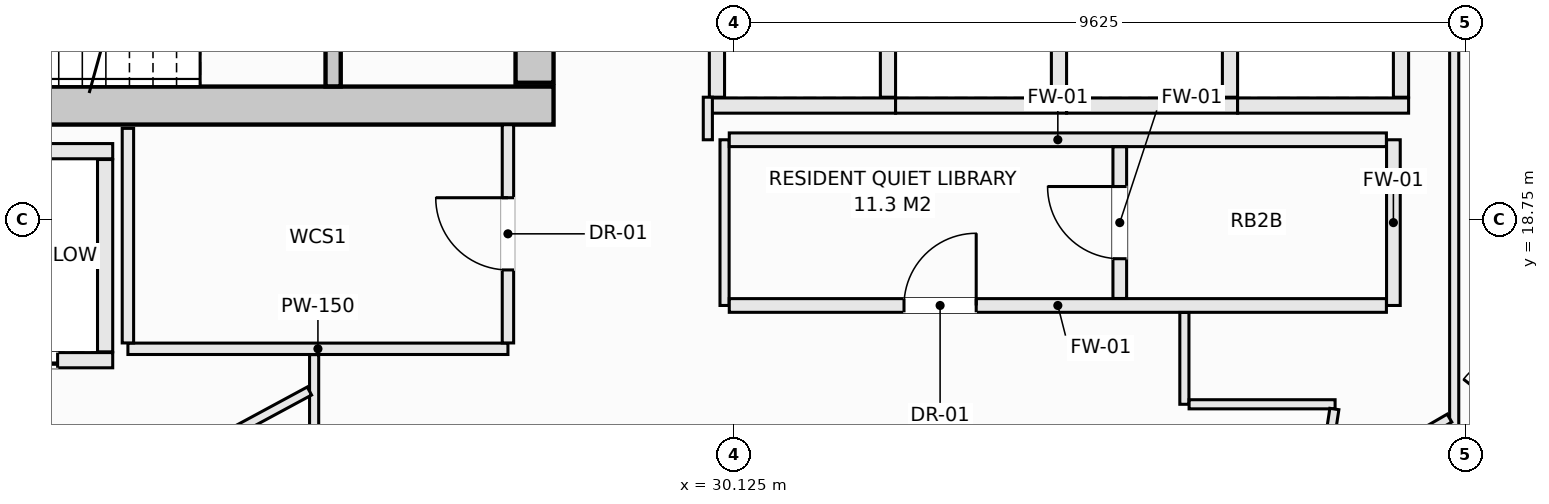
"""IFC4 building model, lengths in metres.
Left out: names, types, materials, properties, quantities, classifications, styles, units other than length and angle.
Written with IfcOpenShell. Run it as: python <this file> out.ifc"""

import sys

from ifc_helpers import new_model, si_unit, direction, frame, frame_2d, origin, place, context, subcontext, project, spatial, rectangle, extrude, element, fill, save


model = new_model("IFC4")
c1 = context("Model", 3, precision=1e-05, world=origin(), true_north=direction((0.0, 1.0)))
c2 = subcontext(c1, "Body", "Model", "MODEL_VIEW")
j1 = project(units=[si_unit("LENGTHUNIT", "METRE"), si_unit("PLANEANGLEUNIT", "RADIAN")], contexts=[c1])
p1 = place(None, origin())
s1 = spatial("IfcSite", under=j1, at=p1, CompositionType="ELEMENT")
p2 = place(p1, origin())
s2 = spatial("IfcBuilding", under=s1, at=p2, CompositionType="ELEMENT")
p3 = place(p2, frame((0.0, 0.0, 255.8)))
s3 = spatial("IfcBuildingStorey", under=s2, at=p3, CompositionType="ELEMENT", Elevation=255.8)
p4 = place(p3, frame((14.25, 20.25, -0.27), z_axis=(0.0, 0.0, 1.0), x_axis=(1.0, 0.0, 0.0)))
e1 = element("IfcWall", 1, at=p4, inside=s3, PredefinedType="SHEAR", context=c2, shape_type="SweptSolid", body=[
    extrude(rectangle(XDim=13.5, YDim=0.5, at=frame_2d((6.75, 0.0))), origin(), (0.0, 0.0, 1.0), 3.3),
])
p5 = place(p3, frame((27.5, 20.55, -0.27), z_axis=(0.0, 0.0, 1.0), x_axis=(0.0, 1.0, 0.0)))
e2 = element("IfcWall", 2, at=p5, inside=s3, PredefinedType="SHEAR", context=c2, shape_type="SweptSolid", body=[
    extrude(rectangle(XDim=1.5, YDim=0.5, at=frame_2d((0.75, 0.0))), origin(), (0.0, 0.0, 1.0), 3.3),
])
p6 = place(p3, frame((24.85, 20.502, -0.27), z_axis=(0.0, 0.0, 1.0), x_axis=(0.0, 1.0, 0.0)))
e3 = element("IfcWall", 3, at=p6, inside=s3, PredefinedType="SHEAR", context=c2, shape_type="SweptSolid", body=[
    extrude(rectangle(XDim=3.038, YDim=0.2, at=frame_2d((1.519, 0.0))), origin(), (0.0, 0.0, 1.0), 3.3),
])
p7 = place(p6, frame((0.969, 0.0, 0.27)))
e4 = element("IfcOpeningElement", 4, at=p7, cuts=e3, PredefinedType="OPENING", context=c2, shape_type="SweptSolid", body=[
    extrude(rectangle(XDim=1.1, YDim=2.15, at=frame_2d((0.55, 1.075))), frame((0.0, 0.11, 0.0), z_axis=(0.0, -1.0, 0.0), x_axis=(1.0, 0.0, 0.0)), (0.0, 0.0, 1.0), 0.22),
])
p8 = place(p3, frame((19.4, 19.65, 0.0), z_axis=(0.0, 0.0, 1.0), x_axis=(1.0, 0.0, 0.0)))
e5 = element("IfcWall", 5, at=p8, inside=s3, PredefinedType="SOLIDWALL", context=c2, shape_type="SweptSolid", body=[
    extrude(rectangle(XDim=2.55, YDim=0.2, at=frame_2d((1.275, 0.0))), origin(), (0.0, 0.0, 1.0), 3.03),
])
p9 = place(p3, frame((19.4, 16.9, 0.0), z_axis=(0.0, 0.0, 1.0), x_axis=(1.0, 0.0, 0.0)))
e6 = element("IfcWall", 6, at=p9, inside=s3, PredefinedType="SOLIDWALL", context=c2, shape_type="SweptSolid", body=[
    extrude(rectangle(XDim=2.55, YDim=0.2, at=frame_2d((1.275, 0.0))), origin(), (0.0, 0.0, 1.0), 3.03),
])
p10 = place(p9, frame((0.725, 0.0, 0.0)))
e7 = element("IfcOpeningElement", 7, at=p10, cuts=e6, PredefinedType="OPENING", context=c2, shape_type="SweptSolid", body=[
    extrude(rectangle(XDim=1.1, YDim=2.2, at=frame_2d((0.55, 1.1))), frame((0.0, 0.11, 0.0), z_axis=(0.0, -1.0, 0.0), x_axis=(1.0, 0.0, 0.0)), (0.0, 0.0, 1.0), 0.22),
])
p11 = place(p3, frame((21.85, 17.01, 0.0), z_axis=(0.0, 0.0, 1.0), x_axis=(0.0, 1.0, 0.0)))
e8 = element("IfcWall", 8, at=p11, inside=s3, PredefinedType="SOLIDWALL", context=c2, shape_type="SweptSolid", body=[
    extrude(rectangle(XDim=2.53, YDim=0.2, at=frame_2d((1.265, 0.0))), origin(), (0.0, 0.0, 1.0), 3.03),
])
p12 = place(p3, frame((29.8, 20.25, 0.0), z_axis=(0.0, 0.0, 1.0), x_axis=(1.0, 0.0, 0.0)))
e9 = element("IfcWall", 9, at=p12, inside=s3, PredefinedType="SOLIDWALL", context=c2, shape_type="SweptSolid", body=[
    extrude(rectangle(XDim=2.45, YDim=0.2, at=frame_2d((1.225, 0.0))), origin(), (0.0, 0.0, 1.0), 3.03),
])
for number, where, z_axis, x_axis in (
    (10, (29.9, 20.36, 0.0), (0.0, 0.0, 1.0), (0.0, 1.0, 0.0)),
    (11, (32.15, 20.36, 0.0), (0.0, 0.0, 1.0), (0.0, 1.0, 0.0)),
):
    element("IfcWall", number, at=place(p3, frame(where, z_axis=z_axis, x_axis=x_axis)), inside=s3, PredefinedType="SOLIDWALL", context=c2, shape_type="SweptSolid", body=[
        extrude(rectangle(XDim=2.43, YDim=0.2, at=frame_2d((1.215, 0.0))), origin(), (0.0, 0.0, 1.0), 3.03),
    ])
p13 = place(p3, frame((32.25, 20.25, 0.0), z_axis=(0.0, 0.0, 1.0), x_axis=(1.0, 0.0, 0.0)))
e12 = element("IfcWall", 12, at=p13, inside=s3, PredefinedType="SOLIDWALL", context=c2, shape_type="SweptSolid", body=[
    extrude(rectangle(XDim=2.25, YDim=0.2, at=frame_2d((1.125, 0.0))), origin(), (0.0, 0.0, 1.0), 3.03),
])
p14 = place(p3, frame((34.4, 20.36, 0.0), z_axis=(0.0, 0.0, 1.0), x_axis=(0.0, 1.0, 0.0)))
e13 = element("IfcWall", 13, at=p14, inside=s3, PredefinedType="SOLIDWALL", context=c2, shape_type="SweptSolid", body=[
    extrude(rectangle(XDim=2.43, YDim=0.2, at=frame_2d((1.215, 0.0))), origin(), (0.0, 0.0, 1.0), 3.03),
])
p15 = place(p3, frame((34.5, 20.25, 0.0), z_axis=(0.0, 0.0, 1.0), x_axis=(1.0, 0.0, 0.0)))
e14 = element("IfcWall", 14, at=p15, inside=s3, PredefinedType="SOLIDWALL", context=c2, shape_type="SweptSolid", body=[
    extrude(rectangle(XDim=2.25, YDim=0.2, at=frame_2d((1.125, 0.0))), origin(), (0.0, 0.0, 1.0), 3.03),
])
p16 = place(p3, frame((36.65, 20.36, 0.0), z_axis=(0.0, 0.0, 1.0), x_axis=(0.0, 1.0, 0.0)))
e15 = element("IfcWall", 15, at=p16, inside=s3, PredefinedType="SOLIDWALL", context=c2, shape_type="SweptSolid", body=[
    extrude(rectangle(XDim=2.43, YDim=0.2, at=frame_2d((1.215, 0.0))), origin(), (0.0, 0.0, 1.0), 3.03),
])
p17 = place(p3, frame((36.75, 20.25, 0.0), z_axis=(0.0, 0.0, 1.0), x_axis=(1.0, 0.0, 0.0)))
e16 = element("IfcWall", 16, at=p17, inside=s3, PredefinedType="SOLIDWALL", context=c2, shape_type="SweptSolid", body=[
    extrude(rectangle(XDim=2.25, YDim=0.2, at=frame_2d((1.125, 0.0))), origin(), (0.0, 0.0, 1.0), 3.03),
])
p18 = place(p3, frame((38.9, 20.36, 0.0), z_axis=(0.0, 0.0, 1.0), x_axis=(0.0, 1.0, 0.0)))
e17 = element("IfcWall", 17, at=p18, inside=s3, PredefinedType="SOLIDWALL", context=c2, shape_type="SweptSolid", body=[
    extrude(rectangle(XDim=2.43, YDim=0.2, at=frame_2d((1.215, 0.0))), origin(), (0.0, 0.0, 1.0), 3.03),
])
p19 = place(p3, frame((22.15, 17.05, 0.0), z_axis=(0.0, 0.0, 1.0), x_axis=(1.0, 0.0, 0.0)))
e18 = element("IfcWall", 18, at=p19, inside=s3, PredefinedType="PARTITIONING", context=c2, shape_type="SweptSolid", body=[
    extrude(rectangle(XDim=5.0, YDim=0.15, at=frame_2d((2.5, 0.0))), origin(), (0.0, 0.0, 1.0), 3.03),
])
p20 = place(p3, frame((22.15, 17.127, 0.0), z_axis=(0.0, 0.0, 1.0), x_axis=(0.0, 1.0, 0.0)))
e19 = element("IfcWall", 19, at=p20, inside=s3, PredefinedType="PARTITIONING", context=c2, shape_type="SweptSolid", body=[
    extrude(rectangle(XDim=2.823, YDim=0.15, at=frame_2d((1.412, 0.0))), origin(), (0.0, 0.0, 1.0), 3.03),
])
p21 = place(p3, frame((27.15, 17.127, 0.0), z_axis=(0.0, 0.0, 1.0), x_axis=(0.0, 1.0, 0.0)))
e20 = element("IfcWall", 20, at=p21, inside=s3, PredefinedType="PARTITIONING", context=c2, shape_type="SweptSolid", body=[
    extrude(rectangle(XDim=2.871, YDim=0.15, at=frame_2d((1.436, 0.0))), origin(), (0.0, 0.0, 1.0), 3.03),
])
p22 = place(p21, frame((0.96, 0.0, 0.0)))
e21 = element("IfcOpeningElement", 21, at=p22, cuts=e20, PredefinedType="OPENING", context=c2, shape_type="SweptSolid", body=[
    extrude(rectangle(XDim=0.95, YDim=2.1, at=frame_2d((0.475, 1.05))), frame((0.0, 0.085, 0.0), z_axis=(0.0, -1.0, 0.0), x_axis=(1.0, 0.0, 0.0)), (0.0, 0.0, 1.0), 0.17),
])
p23 = place(p3, frame((30.0, 17.62, 0.0), z_axis=(0.0, 0.0, 1.0), x_axis=(0.0, 1.0, 0.0)))
e22 = element("IfcWall", 22, at=p23, inside=s3, PredefinedType="PARTITIONING", context=c2, shape_type="SweptSolid", body=[
    extrude(rectangle(XDim=2.18, YDim=0.12, at=frame_2d((1.09, 0.0))), origin(), (0.0, 0.0, 1.0), 3.03),
])
p24 = place(p3, frame((38.8, 17.62, 0.0), z_axis=(0.0, 0.0, 1.0), x_axis=(0.0, 1.0, 0.0)))
e23 = element("IfcWall", 23, at=p24, inside=s3, PredefinedType="SOLIDWALL", context=c2, shape_type="SweptSolid", body=[
    extrude(rectangle(XDim=2.18, YDim=0.18, at=frame_2d((1.09, 0.0))), origin(), (0.0, 0.0, 1.0), 3.03),
])
p25 = place(p3, frame((30.062, 17.62, 0.0), z_axis=(0.0, 0.0, 1.0), x_axis=(1.0, 0.0, 0.0)))
e24 = element("IfcWall", 24, at=p25, inside=s3, PredefinedType="SOLIDWALL", context=c2, shape_type="SweptSolid", body=[
    extrude(rectangle(XDim=8.646, YDim=0.18, at=frame_2d((4.323, 0.0))), origin(), (0.0, 0.0, 1.0), 3.03),
])
p26 = place(p25, frame((2.299, 0.0, 0.0)))
e25 = element("IfcOpeningElement", 25, at=p26, cuts=e24, PredefinedType="OPENING", context=c2, shape_type="SweptSolid", body=[
    extrude(rectangle(XDim=0.95, YDim=2.1, at=frame_2d((0.475, 1.05))), frame((0.0, 0.1, 0.0), z_axis=(0.0, -1.0, 0.0), x_axis=(1.0, 0.0, 0.0)), (0.0, 0.0, 1.0), 0.2),
])
p27 = place(p3, frame((30.062, 19.8, 0.0), z_axis=(0.0, 0.0, 1.0), x_axis=(1.0, 0.0, 0.0)))
e26 = element("IfcWall", 26, at=p27, inside=s3, PredefinedType="SOLIDWALL", context=c2, shape_type="SweptSolid", body=[
    extrude(rectangle(XDim=8.646, YDim=0.18, at=frame_2d((4.323, 0.0))), origin(), (0.0, 0.0, 1.0), 3.03),
])
p28 = place(p3, frame((35.2, 17.712, 0.0), z_axis=(0.0, 0.0, 1.0), x_axis=(0.0, 1.0, 0.0)))
e27 = element("IfcWall", 27, at=p28, inside=s3, PredefinedType="SOLIDWALL", context=c2, shape_type="SweptSolid", body=[
    extrude(rectangle(XDim=1.996, YDim=0.18, at=frame_2d((0.998, 0.0))), origin(), (0.0, 0.0, 1.0), 3.03),
])
p29 = place(p28, frame((0.523, 0.0, 0.0)))
e28 = element("IfcOpeningElement", 28, at=p29, cuts=e27, PredefinedType="OPENING", context=c2, shape_type="SweptSolid", body=[
    extrude(rectangle(XDim=0.95, YDim=2.1, at=frame_2d((0.475, 1.05))), frame((0.0, 0.1, 0.0), z_axis=(0.0, -1.0, 0.0), x_axis=(1.0, 0.0, 0.0)), (0.0, 0.0, 1.0), 0.2),
])
p30 = place(p3, frame((39.6, 14.952, 0.0), z_axis=(0.0, 0.0, 1.0), x_axis=(0.0, 1.0, 0.0)))
e29 = element("IfcWall", 29, at=p30, inside=s3, PredefinedType="PARTITIONING", context=c2, shape_type="SweptSolid", body=[
    extrude(rectangle(XDim=8.068, YDim=0.12, at=frame_2d((4.034, 0.0))), origin(), (0.0, 0.0, 1.0), 2.478),
])
p31 = place(p3, frame((39.662, 15.031, 0.0), z_axis=(0.0, 0.0, 1.0), x_axis=(0.616500468458, 0.787354540465, 0.0)))
e30 = element("IfcWall", 30, at=p31, inside=s3, PredefinedType="PARTITIONING", context=c2, shape_type="SweptSolid", body=[
    extrude(rectangle(XDim=3.014, YDim=0.12, at=frame_2d((1.507, 0.0))), origin(), (0.0, 0.0, 1.0), 3.03),
])
p32 = place(p31, frame((1.312, 0.0, 0.0)))
e31 = element("IfcOpeningElement", 31, at=p32, cuts=e30, PredefinedType="OPENING", context=c2, shape_type="SweptSolid", body=[
    extrude(rectangle(XDim=0.95, YDim=2.1, at=frame_2d((0.475, 1.05))), frame((0.0, 0.07, 0.0), z_axis=(0.0, -1.0, 0.0), x_axis=(1.0, 0.0, 0.0)), (0.0, 0.0, 1.0), 0.14),
])
p33 = place(p3, frame((29.78, 19.8, 0.0), z_axis=(0.0, 0.0, 1.0), x_axis=(0.0, 1.0, 0.0)))
e32 = element("IfcWall", 32, at=p33, inside=s3, PredefinedType="PARTITIONING", context=c2, shape_type="SweptSolid", body=[
    extrude(rectangle(XDim=0.56, YDim=0.12, at=frame_2d((0.28, 0.0))), origin(), (0.0, 0.0, 1.0), 3.03),
])
p34 = place(p3, frame((36.05, 16.32, 0.0), z_axis=(0.0, 0.0, 1.0), x_axis=(0.0, 1.0, 0.0)))
e33 = element("IfcWall", 33, at=p34, inside=s3, PredefinedType="PARTITIONING", context=c2, shape_type="SweptSolid", body=[
    extrude(rectangle(XDim=1.208, YDim=0.12, at=frame_2d((0.604, 0.0))), origin(), (0.0, 0.0, 1.0), 3.03),
])
p35 = place(p3, frame((36.112, 16.32, 0.0), z_axis=(0.0, 0.0, 1.0), x_axis=(1.0, 0.0, 0.0)))
e34 = element("IfcWall", 34, at=p35, inside=s3, PredefinedType="PARTITIONING", context=c2, shape_type="SweptSolid", body=[
    extrude(rectangle(XDim=1.921, YDim=0.12, at=frame_2d((0.96, 0.0))), origin(), (0.0, 0.0, 1.0), 3.03),
])
p36 = place(p3, frame((37.862, 15.201, 0.0), z_axis=(0.0, 0.0, 1.0), x_axis=(0.150907653202, 0.988547864398, 0.0)))
e35 = element("IfcWall", 35, at=p36, inside=s3, PredefinedType="PARTITIONING", context=c2, shape_type="SweptSolid", body=[
    extrude(rectangle(XDim=1.069, YDim=0.12, at=frame_2d((0.535, 0.0))), origin(), (0.0, 0.0, 1.0), 3.03),
])
p37 = place(p3, frame((24.6, 14.462, 0.0), z_axis=(0.0, 0.0, 1.0), x_axis=(0.0, 1.0, 0.0)))
e36 = element("IfcWall", 36, at=p37, inside=s3, PredefinedType="PARTITIONING", context=c2, shape_type="SweptSolid", body=[
    extrude(rectangle(XDim=2.511, YDim=0.12, at=frame_2d((1.255, 0.0))), origin(), (0.0, 0.0, 1.0), 3.03),
])
p38 = place(p3, frame((17.895, 12.91, 0.0), z_axis=(0.0, 0.0, 1.0), x_axis=(0.880038694226, 0.474901986377, 0.0)))
e37 = element("IfcWall", 37, at=p38, inside=s3, PredefinedType="PARTITIONING", context=c2, shape_type="SweptSolid", body=[
    extrude(rectangle(XDim=7.548, YDim=0.12, at=frame_2d((3.774, 0.0))), origin(), (0.0, 0.0, 1.0), 1.823),
])
p39 = place(p3, frame((37.925, 15.204, 0.0), z_axis=(0.0, 0.0, 1.0), x_axis=(0.865342568062, 0.501180845505, 0.0)))
e38 = element("IfcWall", 38, at=p39, inside=s3, PredefinedType="PARTITIONING", context=c2, shape_type="SweptSolid", body=[
    extrude(rectangle(XDim=1.864, YDim=0.12, at=frame_2d((0.932, 0.0))), origin(), (0.0, 0.0, 1.0), 2.478),
])
p40 = place(p10, origin())
e39 = element("IfcDoor", 39, at=p40, inside=s3, OperationType="SLIDING_TO_LEFT", PredefinedType="DOOR", context=c2, shape_type="SweptSolid", body=[
    extrude(rectangle(XDim=1.1, YDim=2.2, at=frame_2d((0.55, 1.1))), frame((0.0, 0.025, 0.0), z_axis=(0.0, -1.0, 0.0), x_axis=(1.0, 0.0, 0.0)), (0.0, 0.0, 1.0), 0.05),
])
fill(e7, e39)
p41 = place(p22, origin())
e40 = element("IfcDoor", 40, at=p41, inside=s3, OperationType="SINGLE_SWING_RIGHT", PredefinedType="DOOR", context=c2, shape_type="SweptSolid", body=[
    extrude(rectangle(XDim=0.95, YDim=2.1, at=frame_2d((0.475, 1.05))), frame((0.0, 0.025, 0.0), z_axis=(0.0, -1.0, 0.0), x_axis=(1.0, 0.0, 0.0)), (0.0, 0.0, 1.0), 0.05),
])
fill(e21, e40)
p42 = place(p26, origin())
e41 = element("IfcDoor", 41, at=p42, inside=s3, OperationType="SINGLE_SWING_RIGHT", PredefinedType="DOOR", context=c2, shape_type="SweptSolid", body=[
    extrude(rectangle(XDim=0.95, YDim=2.1, at=frame_2d((0.475, 1.05))), frame((0.0, 0.025, 0.0), z_axis=(0.0, -1.0, 0.0), x_axis=(1.0, 0.0, 0.0)), (0.0, 0.0, 1.0), 0.05),
])
fill(e25, e41)
p43 = place(p29, origin())
e42 = element("IfcDoor", 42, at=p43, inside=s3, OperationType="SINGLE_SWING_RIGHT", PredefinedType="DOOR", context=c2, shape_type="SweptSolid", body=[
    extrude(rectangle(XDim=0.95, YDim=2.1, at=frame_2d((0.475, 1.05))), frame((0.0, 0.025, 0.0), z_axis=(0.0, -1.0, 0.0), x_axis=(1.0, 0.0, 0.0)), (0.0, 0.0, 1.0), 0.05),
])
fill(e28, e42)
save(model, sys.argv[1])
